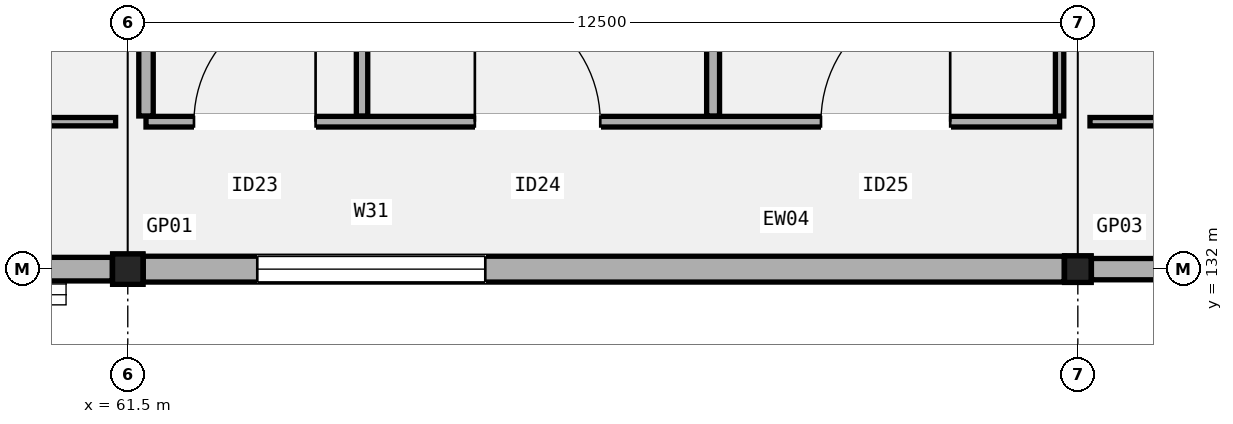
"""IFC4 building model, lengths in metres.
Left out: names, types, materials, properties, quantities, classifications, styles, units other than length and angle.
Written with IfcOpenShell. Run it as: python <this file> out.ifc"""

import sys

from ifc_helpers import new_model, si_unit, direction, frame, frame_2d, origin, origin_2d, place, context, subcontext, project, spatial, rectangle, hollow_rectangle, extrude, element, fill, save


model = new_model("IFC4")
c1 = context("Model", 3, precision=1e-05, world=origin(), true_north=direction((0.0, 1.0)))
c2 = subcontext(c1, "Body", "Model", "MODEL_VIEW")
j1 = project(units=[si_unit("LENGTHUNIT", "METRE"), si_unit("PLANEANGLEUNIT", "RADIAN")], contexts=[c1])
p1 = place(None, origin())
s1 = spatial("IfcSite", under=j1, at=p1, CompositionType="ELEMENT")
p2 = place(p1, origin())
s2 = spatial("IfcBuilding", under=s1, at=p2, CompositionType="ELEMENT")
p3 = place(p2, frame((0.0, 0.0, 20.4)))
s3 = spatial("IfcBuildingStorey", under=s2, at=p3, CompositionType="ELEMENT", Elevation=20.4)
p4 = place(p3, frame((61.5, 132.0, 0.0), z_axis=(0.0, 0.0, 1.0), x_axis=(1.0, 0.0, 0.0)))
e1 = element("IfcColumn", 1, at=p4, inside=s3, PredefinedType="COLUMN", context=c2, shape_type="SweptSolid", body=[
    extrude(hollow_rectangle(XDim=0.4, YDim=0.4, WallThickness=0.016, InnerFilletRadius=0.016, OuterFilletRadius=0.032, at=origin_2d()), origin(), (0.0, 0.0, 1.0), 5.4),
])
p5 = place(p3, frame((74.0, 132.0, 0.0), z_axis=(0.0, 0.0, 1.0), x_axis=(1.0, 0.0, 0.0)))
e2 = element("IfcColumn", 2, at=p5, inside=s3, PredefinedType="COLUMN", context=c2, shape_type="SweptSolid", body=[
    extrude(hollow_rectangle(XDim=0.35, YDim=0.35, WallThickness=0.016, InnerFilletRadius=0.016, OuterFilletRadius=0.032, at=origin_2d()), origin(), (0.0, 0.0, 1.0), 5.4),
])
p6 = place(p3, frame((49.179, 132.0, 0.0), z_axis=(0.0, 0.0, 1.0), x_axis=(1.0, 0.0, 0.0)))
e3 = element("IfcWall", 3, at=p6, inside=s3, PredefinedType="SOLIDWALL", context=c2, shape_type="SweptSolid", body=[
    extrude(rectangle(XDim=12.117, YDim=0.31, at=frame_2d((6.059, 0.0))), origin(), (0.0, 0.0, 1.0), 4.48),
])
p7 = place(p6, frame((1.5, 0.0, 0.95)))
e4 = element("IfcOpeningElement", 4, at=p7, cuts=e3, PredefinedType="OPENING", context=c2, shape_type="SweptSolid", body=[
    extrude(rectangle(XDim=2.55, YDim=1.95, at=frame_2d((1.275, 0.975))), frame((0.0, 0.165, 0.0), z_axis=(0.0, -1.0, 0.0), x_axis=(1.0, 0.0, 0.0)), (0.0, 0.0, 1.0), 0.33),
])
p8 = place(p3, frame((61.704, 132.0, 0.0), z_axis=(0.0, 0.0, 1.0), x_axis=(1.0, 0.0, 0.0)))
e5 = element("IfcWall", 5, at=p8, inside=s3, PredefinedType="SOLIDWALL", context=c2, shape_type="SweptSolid", body=[
    extrude(rectangle(XDim=12.117, YDim=0.34, at=frame_2d((6.059, 0.0))), origin(), (0.0, 0.0, 1.0), 4.58),
])
p9 = place(p8, frame((1.5, 0.0, 0.95)))
e6 = element("IfcOpeningElement", 6, at=p9, cuts=e5, PredefinedType="OPENING", context=c2, shape_type="SweptSolid", body=[
    extrude(rectangle(XDim=3.0, YDim=2.15, at=frame_2d((1.5, 1.075))), frame((0.0, 0.18, 0.0), z_axis=(0.0, -1.0, 0.0), x_axis=(1.0, 0.0, 0.0)), (0.0, 0.0, 1.0), 0.36),
])
p10 = place(p3, frame((74.179, 132.0, 0.0), z_axis=(0.0, 0.0, 1.0), x_axis=(1.0, 0.0, 0.0)))
e7 = element("IfcWall", 7, at=p10, inside=s3, PredefinedType="SOLIDWALL", context=c2, shape_type="SweptSolid", body=[
    extrude(rectangle(XDim=11.967, YDim=0.28, at=frame_2d((5.983, 0.0))), origin(), (0.0, 0.0, 1.0), 4.592),
])
p11 = place(p10, frame((1.5, 0.0, 0.95)))
e8 = element("IfcOpeningElement", 8, at=p11, cuts=e7, PredefinedType="OPENING", context=c2, shape_type="SweptSolid", body=[
    extrude(rectangle(XDim=3.3, YDim=1.8, at=frame_2d((1.65, 0.9))), frame((0.0, 0.15, 0.0), z_axis=(0.0, -1.0, 0.0), x_axis=(1.0, 0.0, 0.0)), (0.0, 0.0, 1.0), 0.3),
])
p12 = place(p3, frame((49.142, 133.94, 0.0), z_axis=(0.0, 0.0, 1.0), x_axis=(1.0, 0.0, 0.0)))
e9 = element("IfcWall", 9, at=p12, inside=s3, PredefinedType="PARTITIONING", context=c2, shape_type="SweptSolid", body=[
    extrude(rectangle(XDim=12.198, YDim=0.11, at=frame_2d((6.099, 0.0))), origin(), (0.0, 0.0, 1.0), 4.52),
])
p13 = place(p12, frame((2.039, 0.0, 0.0)))
e10 = element("IfcOpeningElement", 10, at=p13, cuts=e9, PredefinedType="OPENING", context=c2, shape_type="SweptSolid", body=[
    extrude(rectangle(XDim=1.48, YDim=2.24, at=frame_2d((0.74, 1.12))), frame((0.0, 0.065, 0.0), z_axis=(0.0, -1.0, 0.0), x_axis=(1.0, 0.0, 0.0)), (0.0, 0.0, 1.0), 0.13),
])
p14 = place(p12, frame((8.189, 0.0, 0.0)))
e11 = element("IfcOpeningElement", 11, at=p14, cuts=e9, PredefinedType="OPENING", context=c2, shape_type="SweptSolid", body=[
    extrude(rectangle(XDim=1.52, YDim=2.28, at=frame_2d((0.76, 1.14))), frame((0.0, 0.065, 0.0), z_axis=(0.0, -1.0, 0.0), x_axis=(1.0, 0.0, 0.0)), (0.0, 0.0, 1.0), 0.13),
])
p15 = place(p3, frame((61.74, 133.94, 0.0), z_axis=(0.0, 0.0, 1.0), x_axis=(1.0, 0.0, 0.0)))
e12 = element("IfcWall", 12, at=p15, inside=s3, PredefinedType="PARTITIONING", context=c2, shape_type="SweptSolid", body=[
    extrude(rectangle(XDim=12.02, YDim=0.14, at=frame_2d((6.01, 0.0))), origin(), (0.0, 0.0, 1.0), 4.52),
])
p16 = place(p15, frame((0.631, 0.0, 0.0)))
e13 = element("IfcOpeningElement", 13, at=p16, cuts=e12, PredefinedType="OPENING", context=c2, shape_type="SweptSolid", body=[
    extrude(rectangle(XDim=1.6, YDim=2.3, at=frame_2d((0.8, 1.15))), frame((0.0, 0.08, 0.0), z_axis=(0.0, -1.0, 0.0), x_axis=(1.0, 0.0, 0.0)), (0.0, 0.0, 1.0), 0.16),
])
p17 = place(p15, frame((4.327, 0.0, 0.0)))
e14 = element("IfcOpeningElement", 14, at=p17, cuts=e12, PredefinedType="OPENING", context=c2, shape_type="SweptSolid", body=[
    extrude(rectangle(XDim=1.65, YDim=2.28, at=frame_2d((0.825, 1.14))), frame((0.0, 0.08, 0.0), z_axis=(0.0, -1.0, 0.0), x_axis=(1.0, 0.0, 0.0)), (0.0, 0.0, 1.0), 0.16),
])
p18 = place(p15, frame((8.881, 0.0, 0.0)))
e15 = element("IfcOpeningElement", 15, at=p18, cuts=e12, PredefinedType="OPENING", context=c2, shape_type="SweptSolid", body=[
    extrude(rectangle(XDim=1.7, YDim=2.32, at=frame_2d((0.85, 1.16))), frame((0.0, 0.08, 0.0), z_axis=(0.0, -1.0, 0.0), x_axis=(1.0, 0.0, 0.0)), (0.0, 0.0, 1.0), 0.16),
])
p19 = place(p3, frame((61.74, 134.015, 0.0), z_axis=(0.0, 0.0, 1.0), x_axis=(0.0, 1.0, 0.0)))
e16 = element("IfcWall", 16, at=p19, inside=s3, PredefinedType="PARTITIONING", context=c2, shape_type="SweptSolid", body=[
    extrude(rectangle(XDim=9.745, YDim=0.19, at=frame_2d((4.873, 0.0))), origin(), (0.0, 0.0, 1.0), 4.52),
])
p20 = place(p3, frame((73.76, 134.015, 0.0), z_axis=(0.0, 0.0, 1.0), x_axis=(0.0, 1.0, 0.0)))
e17 = element("IfcWall", 17, at=p20, inside=s3, PredefinedType="PARTITIONING", context=c2, shape_type="SweptSolid", body=[
    extrude(rectangle(XDim=9.631, YDim=0.11, at=frame_2d((4.815, 0.0))), origin(), (0.0, 0.0, 1.0), 4.52),
])
p21 = place(p3, frame((64.582, 134.015, 0.0), z_axis=(0.0, 0.0, 1.0), x_axis=(0.0, 1.0, 0.0)))
e18 = element("IfcWall", 18, at=p21, inside=s3, PredefinedType="PARTITIONING", context=c2, shape_type="SweptSolid", body=[
    extrude(rectangle(XDim=9.68, YDim=0.15, at=frame_2d((4.84, 0.0))), origin(), (0.0, 0.0, 1.0), 4.52),
])
p22 = place(p3, frame((69.201, 134.015, 0.0), z_axis=(0.0, 0.0, 1.0), x_axis=(0.0, 1.0, 0.0)))
e19 = element("IfcWall", 19, at=p22, inside=s3, PredefinedType="PARTITIONING", context=c2, shape_type="SweptSolid", body=[
    extrude(rectangle(XDim=9.68, YDim=0.17, at=frame_2d((4.84, 0.0))), origin(), (0.0, 0.0, 1.0), 4.52),
])
p23 = place(p3, frame((74.16, 133.94, 0.0), z_axis=(0.0, 0.0, 1.0), x_axis=(1.0, 0.0, 0.0)))
e20 = element("IfcWall", 20, at=p23, inside=s3, PredefinedType="PARTITIONING", context=c2, shape_type="SweptSolid", body=[
    extrude(rectangle(XDim=12.18, YDim=0.11, at=frame_2d((6.09, 0.0))), origin(), (0.0, 0.0, 1.0), 4.52),
])
p24 = place(p23, frame((2.302, 0.0, 0.0)))
e21 = element("IfcOpeningElement", 21, at=p24, cuts=e20, PredefinedType="OPENING", context=c2, shape_type="SweptSolid", body=[
    extrude(rectangle(XDim=0.92, YDim=2.1, at=frame_2d((0.46, 1.05))), frame((0.0, 0.065, 0.0), z_axis=(0.0, -1.0, 0.0), x_axis=(1.0, 0.0, 0.0)), (0.0, 0.0, 1.0), 0.13),
])
p25 = place(p23, frame((8.456, 0.0, 0.0)))
e22 = element("IfcOpeningElement", 22, at=p25, cuts=e20, PredefinedType="OPENING", context=c2, shape_type="SweptSolid", body=[
    extrude(rectangle(XDim=0.95, YDim=2.12, at=frame_2d((0.475, 1.06))), frame((0.0, 0.065, 0.0), z_axis=(0.0, -1.0, 0.0), x_axis=(1.0, 0.0, 0.0)), (0.0, 0.0, 1.0), 0.13),
])
p26 = place(p9, origin())
e23 = element("IfcWindow", 23, at=p26, inside=s3, PartitioningType="SINGLE_PANEL", PredefinedType="WINDOW", context=c2, shape_type="SweptSolid", body=[
    extrude(rectangle(XDim=3.0, YDim=2.15, at=frame_2d((1.5, 1.075))), frame((0.0, 0.03, 0.0), z_axis=(0.0, -1.0, 0.0), x_axis=(1.0, 0.0, 0.0)), (0.0, 0.0, 1.0), 0.06),
])
fill(e6, e23)
p27 = place(p16, origin())
e24 = element("IfcDoor", 24, at=p27, inside=s3, OperationType="SINGLE_SWING_RIGHT", PredefinedType="DOOR", context=c2, shape_type="SweptSolid", body=[
    extrude(rectangle(XDim=1.6, YDim=2.3, at=frame_2d((0.8, 1.15))), frame((0.0, 0.025, 0.0), z_axis=(0.0, -1.0, 0.0), x_axis=(1.0, 0.0, 0.0)), (0.0, 0.0, 1.0), 0.05),
])
fill(e13, e24)
p28 = place(p17, origin())
e25 = element("IfcDoor", 25, at=p28, inside=s3, OperationType="SINGLE_SWING_LEFT", PredefinedType="DOOR", context=c2, shape_type="SweptSolid", body=[
    extrude(rectangle(XDim=1.65, YDim=2.28, at=frame_2d((0.825, 1.14))), frame((0.0, 0.025, 0.0), z_axis=(0.0, -1.0, 0.0), x_axis=(1.0, 0.0, 0.0)), (0.0, 0.0, 1.0), 0.05),
])
fill(e14, e25)
p29 = place(p18, origin())
e26 = element("IfcDoor", 26, at=p29, inside=s3, OperationType="SINGLE_SWING_RIGHT", PredefinedType="DOOR", context=c2, shape_type="SweptSolid", body=[
    extrude(rectangle(XDim=1.7, YDim=2.32, at=frame_2d((0.85, 1.16))), frame((0.0, 0.025, 0.0), z_axis=(0.0, -1.0, 0.0), x_axis=(1.0, 0.0, 0.0)), (0.0, 0.0, 1.0), 0.05),
])
fill(e15, e26)
save(model, sys.argv[1])
